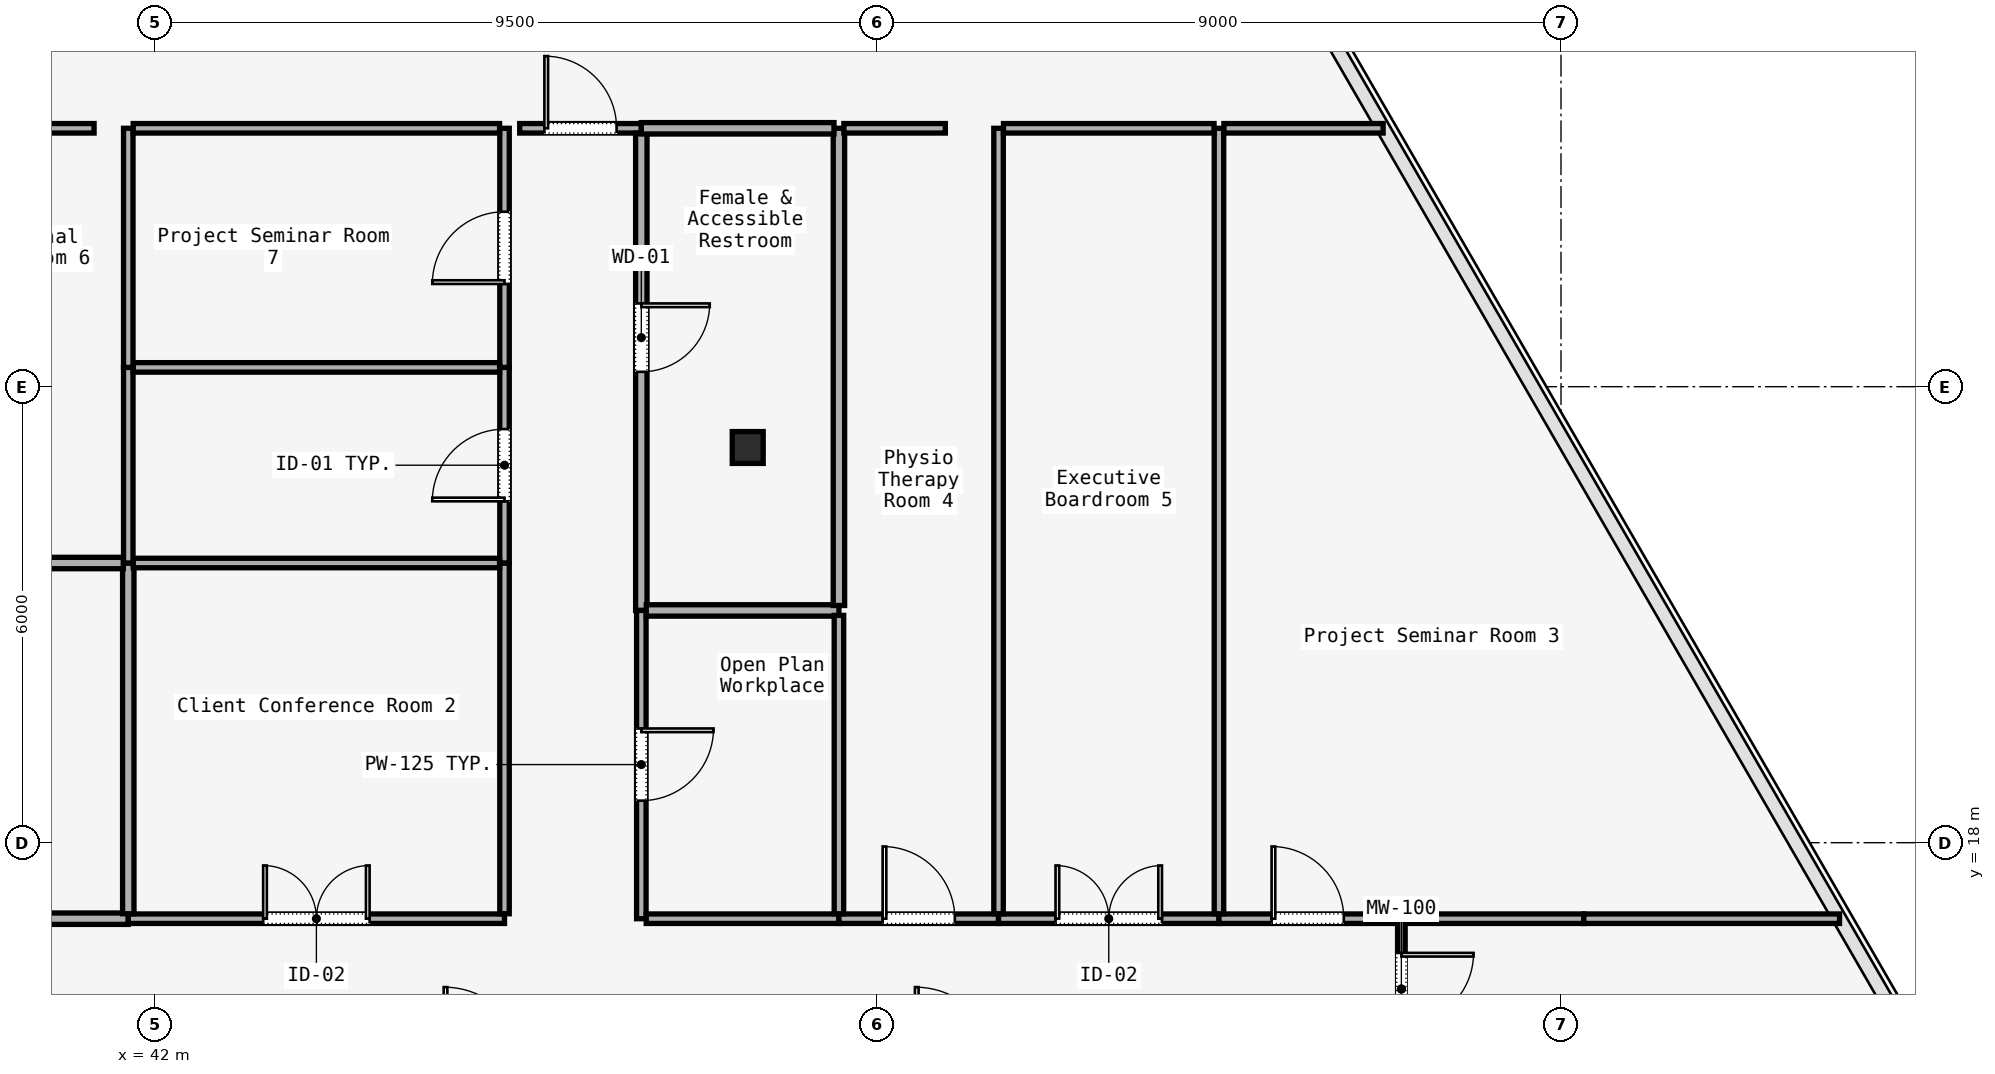
"""IFC4 building model, lengths in metres.
Left out: names, types, materials, properties, quantities, classifications, styles, units other than length and angle.
Written with IfcOpenShell. Run it as: python <this file> out.ifc"""

import sys

from ifc_helpers import new_model, si_unit, direction, frame, frame_2d, origin, origin_2d, place, context, subcontext, project, spatial, rectangle, i_section, extrude, element, fill, save


model = new_model("IFC4")
c1 = context("Model", 3, precision=1e-05, world=origin(), true_north=direction((0.0, 1.0)))
c2 = subcontext(c1, "Body", "Model", "MODEL_VIEW")
j1 = project(units=[si_unit("LENGTHUNIT", "METRE"), si_unit("PLANEANGLEUNIT", "RADIAN")], contexts=[c1])
p1 = place(None, origin())
s1 = spatial("IfcSite", under=j1, at=p1, CompositionType="ELEMENT")
p2 = place(p1, origin())
s2 = spatial("IfcBuilding", under=s1, at=p2, CompositionType="ELEMENT")
p3 = place(p2, frame((0.0, 0.0, 168.8)))
s3 = spatial("IfcBuildingStorey", under=s2, at=p3, CompositionType="ELEMENT", Elevation=168.8)
p4 = place(p3, frame((49.8, 23.2, 0.0), z_axis=(0.0, 0.0, 1.0), x_axis=(1.0, 0.0, 0.0)))
e1 = element("IfcColumn", 1, at=p4, inside=s3, PredefinedType="COLUMN", context=c2, shape_type="SweptSolid", body=[
    extrude(i_section(OverallWidth=0.407, OverallDepth=0.419, WebThickness=0.031, FlangeThickness=0.049, FilletRadius=0.015, at=origin_2d()), origin(), (0.0, 0.0, 1.0), 3.58),
])
p5 = place(p3, frame((58.4, 17.0, 0.0), z_axis=(0.0, 0.0, 1.0), x_axis=(0.0, -1.0, 0.0)))
e2 = element("IfcWall", 2, at=p5, inside=s3, PredefinedType="MOVABLE", context=c2, shape_type="SweptSolid", body=[
    extrude(rectangle(XDim=1.85, YDim=0.1, at=frame_2d((0.925, 0.0))), origin(), (0.0, 0.0, 1.0), 3.01),
])
p6 = place(p5, frame((0.45, 0.0, 0.0)))
e3 = element("IfcOpeningElement", 3, at=p6, cuts=e2, PredefinedType="OPENING", context=c2, shape_type="SweptSolid", body=[
    extrude(rectangle(XDim=0.95, YDim=2.2, at=frame_2d((0.475, 1.1))), frame((0.0, 0.05, 0.0), z_axis=(0.0, -1.0, 0.0), x_axis=(1.0, 0.0, 0.0)), (0.0, 0.0, 1.0), 0.1),
])
p7 = place(p3, frame((37.665, 17.0, 0.0), z_axis=(0.0, 0.0, 1.0), x_axis=(1.0, 0.0, 0.0)))
e4 = element("IfcWall", 4, at=p7, inside=s3, PredefinedType="PARTITIONING", context=c2, shape_type="SweptSolid", body=[
    extrude(rectangle(XDim=3.985, YDim=0.15, at=frame_2d((1.992, 0.0))), origin(), (0.0, 0.0, 1.0), 3.01),
])
p8 = place(p3, frame((41.65, 17.0, 0.0), z_axis=(0.0, 0.0, 1.0), x_axis=(1.0, 0.0, 0.0)))
e5 = element("IfcWall", 5, at=p8, inside=s3, PredefinedType="PARTITIONING", context=c2, shape_type="SweptSolid", body=[
    extrude(rectangle(XDim=4.95, YDim=0.125, at=frame_2d((2.475, 0.0))), origin(), (0.0, 0.0, 1.0), 3.01),
])
p9 = place(p8, frame((1.775, 0.0, 0.0)))
e6 = element("IfcOpeningElement", 6, at=p9, cuts=e5, PredefinedType="OPENING", context=c2, shape_type="SweptSolid", body=[
    extrude(rectangle(XDim=1.4, YDim=2.2, at=frame_2d((0.7, 1.1))), frame((0.0, 0.062, 0.0), z_axis=(0.0, -1.0, 0.0), x_axis=(1.0, 0.0, 0.0)), (0.0, 0.0, 1.0), 0.125),
])
p10 = place(p3, frame((46.6, 17.065, 0.0), z_axis=(0.0, 0.0, 1.0), x_axis=(0.0, 1.0, 0.0)))
e7 = element("IfcWall", 7, at=p10, inside=s3, PredefinedType="PARTITIONING", context=c2, shape_type="SweptSolid", body=[
    extrude(rectangle(XDim=4.615, YDim=0.125, at=frame_2d((2.308, 0.0))), origin(), (0.0, 0.0, 1.0), 3.01),
])
p11 = place(p3, frame((46.6, 21.68, 0.0), z_axis=(0.0, 0.0, 1.0), x_axis=(0.0, 1.0, 0.0)))
e8 = element("IfcWall", 8, at=p11, inside=s3, PredefinedType="PARTITIONING", context=c2, shape_type="SweptSolid", body=[
    extrude(rectangle(XDim=2.574, YDim=0.125, at=frame_2d((1.287, 0.0))), origin(), (0.0, 0.0, 1.0), 3.01),
])
p12 = place(p11, frame((0.812, 0.0, 0.0)))
e9 = element("IfcOpeningElement", 9, at=p12, cuts=e8, PredefinedType="OPENING", context=c2, shape_type="SweptSolid", body=[
    extrude(rectangle(XDim=0.95, YDim=2.2, at=frame_2d((0.475, 1.1))), frame((0.0, 0.062, 0.0), z_axis=(0.0, -1.0, 0.0), x_axis=(1.0, 0.0, 0.0)), (0.0, 0.0, 1.0), 0.125),
])
p13 = place(p3, frame((46.6, 24.254, 0.0), z_axis=(0.0, 0.0, 1.0), x_axis=(0.0, 1.0, 0.0)))
e10 = element("IfcWall", 10, at=p13, inside=s3, PredefinedType="PARTITIONING", context=c2, shape_type="SweptSolid", body=[
    extrude(rectangle(XDim=3.146, YDim=0.125, at=frame_2d((1.573, 0.0))), origin(), (0.0, 0.0, 1.0), 3.01),
])
p14 = place(p13, frame((1.098, 0.0, 0.0)))
e11 = element("IfcOpeningElement", 11, at=p14, cuts=e10, PredefinedType="OPENING", context=c2, shape_type="SweptSolid", body=[
    extrude(rectangle(XDim=0.95, YDim=2.2, at=frame_2d((0.475, 1.1))), frame((0.0, 0.062, 0.0), z_axis=(0.0, -1.0, 0.0), x_axis=(1.0, 0.0, 0.0)), (0.0, 0.0, 1.0), 0.125),
])
p15 = place(p3, frame((46.8, 27.4, 0.0), z_axis=(0.0, 0.0, 1.0), x_axis=(1.0, 0.0, 0.0)))
e12 = element("IfcWall", 12, at=p15, inside=s3, PredefinedType="PARTITIONING", context=c2, shape_type="SweptSolid", body=[
    extrude(rectangle(XDim=1.6, YDim=0.125, at=frame_2d((0.8, 0.0))), origin(), (0.0, 0.0, 1.0), 3.01),
])
p16 = place(p15, frame((0.325, 0.0, 0.0)))
e13 = element("IfcOpeningElement", 13, at=p16, cuts=e12, PredefinedType="OPENING", context=c2, shape_type="SweptSolid", body=[
    extrude(rectangle(XDim=0.95, YDim=2.2, at=frame_2d((0.475, 1.1))), frame((0.0, 0.062, 0.0), z_axis=(0.0, -1.0, 0.0), x_axis=(1.0, 0.0, 0.0)), (0.0, 0.0, 1.0), 0.125),
])
p17 = place(p3, frame((48.4, 27.335, 0.0), z_axis=(0.0, 0.0, 1.0), x_axis=(0.0, -1.0, 0.0)))
e14 = element("IfcWall", 14, at=p17, inside=s3, PredefinedType="PARTITIONING", context=c2, shape_type="SweptSolid", body=[
    extrude(rectangle(XDim=6.279, YDim=0.15, at=frame_2d((3.14, 0.0))), origin(), (0.0, 0.0, 1.0), 3.01),
])
p18 = place(p17, frame((2.24, 0.0, 0.0)))
e15 = element("IfcOpeningElement", 15, at=p18, cuts=e14, PredefinedType="OPENING", context=c2, shape_type="SweptSolid", body=[
    extrude(rectangle(XDim=0.9, YDim=2.15, at=frame_2d((0.45, 1.075))), frame((0.0, 0.075, 0.0), z_axis=(0.0, -1.0, 0.0), x_axis=(1.0, 0.0, 0.0)), (0.0, 0.0, 1.0), 0.15),
])
p19 = place(p3, frame((48.4, 21.056, 0.0), z_axis=(0.0, 0.0, 1.0), x_axis=(0.0, -1.0, 0.0)))
e16 = element("IfcWall", 16, at=p19, inside=s3, PredefinedType="PARTITIONING", context=c2, shape_type="SweptSolid", body=[
    extrude(rectangle(XDim=4.056, YDim=0.125, at=frame_2d((2.028, 0.0))), origin(), (0.0, 0.0, 1.0), 3.01),
])
p20 = place(p19, frame((1.553, 0.0, 0.0)))
e17 = element("IfcOpeningElement", 17, at=p20, cuts=e16, PredefinedType="OPENING", context=c2, shape_type="SweptSolid", body=[
    extrude(rectangle(XDim=0.95, YDim=2.2, at=frame_2d((0.475, 1.1))), frame((0.0, 0.062, 0.0), z_axis=(0.0, -1.0, 0.0), x_axis=(1.0, 0.0, 0.0)), (0.0, 0.0, 1.0), 0.125),
])
p21 = place(p3, frame((48.465, 17.0, 0.0), z_axis=(0.0, 0.0, 1.0), x_axis=(1.0, 0.0, 0.0)))
e18 = element("IfcWall", 18, at=p21, inside=s3, PredefinedType="PARTITIONING", context=c2, shape_type="SweptSolid", body=[
    extrude(rectangle(XDim=2.535, YDim=0.125, at=frame_2d((1.268, 0.0))), origin(), (0.0, 0.0, 1.0), 3.01),
])
p22 = place(p3, frame((51.0, 17.0, 0.0), z_axis=(0.0, 0.0, 1.0), x_axis=(1.0, 0.0, 0.0)))
e19 = element("IfcWall", 19, at=p22, inside=s3, PredefinedType="PARTITIONING", context=c2, shape_type="SweptSolid", body=[
    extrude(rectangle(XDim=2.1, YDim=0.125, at=frame_2d((1.05, 0.0))), origin(), (0.0, 0.0, 1.0), 3.01),
])
p23 = place(p22, frame((0.575, 0.0, 0.0)))
e20 = element("IfcOpeningElement", 20, at=p23, cuts=e19, PredefinedType="OPENING", context=c2, shape_type="SweptSolid", body=[
    extrude(rectangle(XDim=0.95, YDim=2.2, at=frame_2d((0.475, 1.1))), frame((0.0, 0.062, 0.0), z_axis=(0.0, -1.0, 0.0), x_axis=(1.0, 0.0, 0.0)), (0.0, 0.0, 1.0), 0.125),
])
p24 = place(p3, frame((53.1, 17.0, 0.0), z_axis=(0.0, 0.0, 1.0), x_axis=(1.0, 0.0, 0.0)))
e21 = element("IfcWall", 21, at=p24, inside=s3, PredefinedType="PARTITIONING", context=c2, shape_type="SweptSolid", body=[
    extrude(rectangle(XDim=2.9, YDim=0.125, at=frame_2d((1.45, 0.0))), origin(), (0.0, 0.0, 1.0), 3.01),
])
p25 = place(p24, frame((0.75, 0.0, 0.0)))
e22 = element("IfcOpeningElement", 22, at=p25, cuts=e21, PredefinedType="OPENING", context=c2, shape_type="SweptSolid", body=[
    extrude(rectangle(XDim=1.4, YDim=2.2, at=frame_2d((0.7, 1.1))), frame((0.0, 0.062, 0.0), z_axis=(0.0, -1.0, 0.0), x_axis=(1.0, 0.0, 0.0)), (0.0, 0.0, 1.0), 0.125),
])
p26 = place(p3, frame((56.0, 17.0, 0.0), z_axis=(0.0, 0.0, 1.0), x_axis=(1.0, 0.0, 0.0)))
e23 = element("IfcWall", 23, at=p26, inside=s3, PredefinedType="PARTITIONING", context=c2, shape_type="SweptSolid", body=[
    extrude(rectangle(XDim=2.335, YDim=0.125, at=frame_2d((1.167, 0.0))), origin(), (0.0, 0.0, 1.0), 3.01),
])
p27 = place(p26, frame((0.692, 0.0, 0.0)))
e24 = element("IfcOpeningElement", 24, at=p27, cuts=e23, PredefinedType="OPENING", context=c2, shape_type="SweptSolid", body=[
    extrude(rectangle(XDim=0.95, YDim=2.2, at=frame_2d((0.475, 1.1))), frame((0.0, 0.062, 0.0), z_axis=(0.0, -1.0, 0.0), x_axis=(1.0, 0.0, 0.0)), (0.0, 0.0, 1.0), 0.125),
])
p28 = place(p3, frame((58.465, 17.0, 0.0), z_axis=(0.0, 0.0, 1.0), x_axis=(1.0, 0.0, 0.0)))
e25 = element("IfcWall", 25, at=p28, inside=s3, PredefinedType="PARTITIONING", context=c2, shape_type="SweptSolid", body=[
    extrude(rectangle(XDim=2.335, YDim=0.125, at=frame_2d((1.167, 0.0))), origin(), (0.0, 0.0, 1.0), 3.01),
])
p29 = place(p3, frame((60.8, 17.0, 0.0), z_axis=(0.0, 0.0, 1.0), x_axis=(1.0, 0.0, 0.0)))
e26 = element("IfcWall", 26, at=p29, inside=s3, PredefinedType="PARTITIONING", context=c2, shape_type="SweptSolid", body=[
    extrude(rectangle(XDim=3.365, YDim=0.125, at=frame_2d((1.682, 0.0))), origin(), (0.0, 0.0, 1.0), 3.01),
])
p30 = place(p3, frame((48.465, 21.056, 0.0), z_axis=(0.0, 0.0, 1.0), x_axis=(1.0, 0.0, 0.0)))
e27 = element("IfcWall", 27, at=p30, inside=s3, PredefinedType="PARTITIONING", context=c2, shape_type="SweptSolid", body=[
    extrude(rectangle(XDim=2.535, YDim=0.15, at=frame_2d((1.268, 0.0))), origin(), (0.0, 0.0, 1.0), 3.01),
])
p31 = place(p3, frame((51.0, 20.991, 0.0), z_axis=(0.0, 0.0, 1.0), x_axis=(0.0, -1.0, 0.0)))
e28 = element("IfcWall", 28, at=p31, inside=s3, PredefinedType="PARTITIONING", context=c2, shape_type="SweptSolid", body=[
    extrude(rectangle(XDim=3.926, YDim=0.125, at=frame_2d((1.963, 0.0))), origin(), (0.0, 0.0, 1.0), 3.01),
])
p32 = place(p3, frame((41.65, 21.68, 0.0), z_axis=(0.0, 0.0, 1.0), x_axis=(0.0, -1.0, 0.0)))
e29 = element("IfcWall", 29, at=p32, inside=s3, PredefinedType="PARTITIONING", context=c2, shape_type="SweptSolid", body=[
    extrude(rectangle(XDim=4.615, YDim=0.15, at=frame_2d((2.308, 0.0))), origin(), (0.0, 0.0, 1.0), 3.01),
])
p33 = place(p3, frame((37.665, 21.68, 0.0), z_axis=(0.0, 0.0, 1.0), x_axis=(1.0, 0.0, 0.0)))
e30 = element("IfcWall", 30, at=p33, inside=s3, PredefinedType="PARTITIONING", context=c2, shape_type="SweptSolid", body=[
    extrude(rectangle(XDim=3.92, YDim=0.15, at=frame_2d((1.96, 0.0))), origin(), (0.0, 0.0, 1.0), 3.01),
])
p34 = place(p3, frame((41.715, 21.68, 0.0), z_axis=(0.0, 0.0, 1.0), x_axis=(1.0, 0.0, 0.0)))
e31 = element("IfcWall", 31, at=p34, inside=s3, PredefinedType="PARTITIONING", context=c2, shape_type="SweptSolid", body=[
    extrude(rectangle(XDim=4.82, YDim=0.125, at=frame_2d((2.41, 0.0))), origin(), (0.0, 0.0, 1.0), 3.01),
])
p35 = place(p3, frame((56.0, 17.065, 0.0), z_axis=(0.0, 0.0, 1.0), x_axis=(0.0, 1.0, 0.0)))
e32 = element("IfcWall", 32, at=p35, inside=s3, PredefinedType="PARTITIONING", context=c2, shape_type="SweptSolid", body=[
    extrude(rectangle(XDim=10.335, YDim=0.125, at=frame_2d((5.167, 0.0))), origin(), (0.0, 0.0, 1.0), 3.01),
])
p36 = place(p3, frame((56.065, 27.4, 0.0), z_axis=(0.0, 0.0, 1.0), x_axis=(1.0, 0.0, 0.0)))
e33 = element("IfcWall", 33, at=p36, inside=s3, PredefinedType="PARTITIONING", context=c2, shape_type="SweptSolid", body=[
    extrude(rectangle(XDim=2.095, YDim=0.125, at=frame_2d((1.048, 0.0))), origin(), (0.0, 0.0, 1.0), 3.01),
])
p37 = place(p3, frame((51.0, 21.121, 0.0), z_axis=(0.0, 0.0, 1.0), x_axis=(0.0, 1.0, 0.0)))
e34 = element("IfcWall", 34, at=p37, inside=s3, PredefinedType="PARTITIONING", context=c2, shape_type="SweptSolid", body=[
    extrude(rectangle(XDim=6.279, YDim=0.15, at=frame_2d((3.139, 0.0))), origin(), (0.0, 0.0, 1.0), 3.01),
])
p38 = place(p3, frame((51.065, 27.4, 0.0), z_axis=(0.0, 0.0, 1.0), x_axis=(1.0, 0.0, 0.0)))
e35 = element("IfcWall", 35, at=p38, inside=s3, PredefinedType="PARTITIONING", context=c2, shape_type="SweptSolid", body=[
    extrude(rectangle(XDim=1.335, YDim=0.125, at=frame_2d((0.667, 0.0))), origin(), (0.0, 0.0, 1.0), 3.01),
])
p39 = place(p3, frame((53.1, 27.4, 0.0), z_axis=(0.0, 0.0, 1.0), x_axis=(0.0, -1.0, 0.0)))
e36 = element("IfcWall", 36, at=p39, inside=s3, PredefinedType="PARTITIONING", context=c2, shape_type="SweptSolid", body=[
    extrude(rectangle(XDim=10.335, YDim=0.125, at=frame_2d((5.167, 0.0))), origin(), (0.0, 0.0, 1.0), 3.01),
])
p40 = place(p3, frame((53.165, 27.4, 0.0), z_axis=(0.0, 0.0, 1.0), x_axis=(1.0, 0.0, 0.0)))
e37 = element("IfcWall", 37, at=p40, inside=s3, PredefinedType="PARTITIONING", context=c2, shape_type="SweptSolid", body=[
    extrude(rectangle(XDim=2.77, YDim=0.125, at=frame_2d((1.385, 0.0))), origin(), (0.0, 0.0, 1.0), 3.01),
])
p41 = place(p3, frame((41.65, 21.68, 0.0), z_axis=(0.0, 0.0, 1.0), x_axis=(0.0, 1.0, 0.0)))
e38 = element("IfcWall", 38, at=p41, inside=s3, PredefinedType="PARTITIONING", context=c2, shape_type="SweptSolid", body=[
    extrude(rectangle(XDim=2.574, YDim=0.125, at=frame_2d((1.287, 0.0))), origin(), (0.0, 0.0, 1.0), 3.01),
])
p42 = place(p3, frame((41.715, 24.254, 0.0), z_axis=(0.0, 0.0, 1.0), x_axis=(1.0, 0.0, 0.0)))
e39 = element("IfcWall", 39, at=p42, inside=s3, PredefinedType="PARTITIONING", context=c2, shape_type="SweptSolid", body=[
    extrude(rectangle(XDim=4.82, YDim=0.125, at=frame_2d((2.41, 0.0))), origin(), (0.0, 0.0, 1.0), 3.01),
])
p43 = place(p3, frame((48.4, 27.4, 0.0), z_axis=(0.0, 0.0, 1.0), x_axis=(1.0, 0.0, 0.0)))
e40 = element("IfcWall", 40, at=p43, inside=s3, PredefinedType="PARTITIONING", context=c2, shape_type="SweptSolid", body=[
    extrude(rectangle(XDim=2.535, YDim=0.15, at=frame_2d((1.268, 0.0))), origin(), (0.0, 0.0, 1.0), 3.01),
])
p44 = place(p3, frame((41.65, 27.4, 0.0), z_axis=(0.0, 0.0, 1.0), x_axis=(0.0, -1.0, 0.0)))
e41 = element("IfcWall", 41, at=p44, inside=s3, PredefinedType="PARTITIONING", context=c2, shape_type="SweptSolid", body=[
    extrude(rectangle(XDim=3.146, YDim=0.125, at=frame_2d((1.573, 0.0))), origin(), (0.0, 0.0, 1.0), 3.01),
])
p45 = place(p3, frame((38.445, 27.4, 0.0), z_axis=(0.0, 0.0, 1.0), x_axis=(1.0, 0.0, 0.0)))
e42 = element("IfcWall", 42, at=p45, inside=s3, PredefinedType="PARTITIONING", context=c2, shape_type="SweptSolid", body=[
    extrude(rectangle(XDim=2.755, YDim=0.125, at=frame_2d((1.377, 0.0))), origin(), (0.0, 0.0, 1.0), 3.01),
])
p46 = place(p3, frame((41.715, 27.4, 0.0), z_axis=(0.0, 0.0, 1.0), x_axis=(1.0, 0.0, 0.0)))
e43 = element("IfcWall", 43, at=p46, inside=s3, PredefinedType="PARTITIONING", context=c2, shape_type="SweptSolid", body=[
    extrude(rectangle(XDim=4.82, YDim=0.125, at=frame_2d((2.41, 0.0))), origin(), (0.0, 0.0, 1.0), 3.01),
])
p47 = place(p6, origin())
e44 = element("IfcDoor", 44, at=p47, inside=s3, OperationType="SINGLE_SWING_RIGHT", PredefinedType="DOOR", context=c2, shape_type="SweptSolid", body=[
    extrude(rectangle(XDim=0.95, YDim=2.2, at=frame_2d((0.475, 1.1))), frame((0.0, 0.025, 0.0), z_axis=(0.0, -1.0, 0.0), x_axis=(1.0, 0.0, 0.0)), (0.0, 0.0, 1.0), 0.05),
])
fill(e3, e44)
p48 = place(p20, origin())
e45 = element("IfcDoor", 45, at=p48, inside=s3, OperationType="SINGLE_SWING_LEFT", PredefinedType="DOOR", context=c2, shape_type="SweptSolid", body=[
    extrude(rectangle(XDim=0.95, YDim=2.2, at=frame_2d((0.475, 1.1))), frame((0.0, 0.025, 0.0), z_axis=(0.0, -1.0, 0.0), x_axis=(1.0, 0.0, 0.0)), (0.0, 0.0, 1.0), 0.05),
])
fill(e17, e45)
p49 = place(p9, origin())
e46 = element("IfcDoor", 46, at=p49, inside=s3, OperationType="SINGLE_SWING_RIGHT", PredefinedType="DOOR", context=c2, shape_type="SweptSolid", body=[
    extrude(rectangle(XDim=1.4, YDim=2.2, at=frame_2d((0.7, 1.1))), frame((0.0, 0.025, 0.0), z_axis=(0.0, -1.0, 0.0), x_axis=(1.0, 0.0, 0.0)), (0.0, 0.0, 1.0), 0.05),
])
fill(e6, e46)
p50 = place(p27, origin())
e47 = element("IfcDoor", 47, at=p50, inside=s3, OperationType="SINGLE_SWING_LEFT", PredefinedType="DOOR", context=c2, shape_type="SweptSolid", body=[
    extrude(rectangle(XDim=0.95, YDim=2.2, at=frame_2d((0.475, 1.1))), frame((0.0, 0.025, 0.0), z_axis=(0.0, -1.0, 0.0), x_axis=(1.0, 0.0, 0.0)), (0.0, 0.0, 1.0), 0.05),
])
fill(e24, e47)
p51 = place(p23, origin())
e48 = element("IfcDoor", 48, at=p51, inside=s3, OperationType="SINGLE_SWING_LEFT", PredefinedType="DOOR", context=c2, shape_type="SweptSolid", body=[
    extrude(rectangle(XDim=0.95, YDim=2.2, at=frame_2d((0.475, 1.1))), frame((0.0, 0.025, 0.0), z_axis=(0.0, -1.0, 0.0), x_axis=(1.0, 0.0, 0.0)), (0.0, 0.0, 1.0), 0.05),
])
fill(e20, e48)
p52 = place(p25, origin())
e49 = element("IfcDoor", 49, at=p52, inside=s3, OperationType="SINGLE_SWING_RIGHT", PredefinedType="DOOR", context=c2, shape_type="SweptSolid", body=[
    extrude(rectangle(XDim=1.4, YDim=2.2, at=frame_2d((0.7, 1.1))), frame((0.0, 0.025, 0.0), z_axis=(0.0, -1.0, 0.0), x_axis=(1.0, 0.0, 0.0)), (0.0, 0.0, 1.0), 0.05),
])
fill(e22, e49)
p53 = place(p12, origin())
e50 = element("IfcDoor", 50, at=p53, inside=s3, OperationType="SINGLE_SWING_LEFT", PredefinedType="DOOR", context=c2, shape_type="SweptSolid", body=[
    extrude(rectangle(XDim=0.95, YDim=2.2, at=frame_2d((0.475, 1.1))), frame((0.0, 0.025, 0.0), z_axis=(0.0, -1.0, 0.0), x_axis=(1.0, 0.0, 0.0)), (0.0, 0.0, 1.0), 0.05),
])
fill(e9, e50)
p54 = place(p18, origin())
e51 = element("IfcDoor", 51, at=p54, inside=s3, OperationType="SINGLE_SWING_RIGHT", PredefinedType="DOOR", context=c2, shape_type="SweptSolid", body=[
    extrude(rectangle(XDim=0.9, YDim=2.15, at=frame_2d((0.45, 1.075))), frame((0.0, 0.025, 0.0), z_axis=(0.0, -1.0, 0.0), x_axis=(1.0, 0.0, 0.0)), (0.0, 0.0, 1.0), 0.05),
])
fill(e15, e51)
p55 = place(p14, origin())
e52 = element("IfcDoor", 52, at=p55, inside=s3, OperationType="SINGLE_SWING_LEFT", PredefinedType="DOOR", context=c2, shape_type="SweptSolid", body=[
    extrude(rectangle(XDim=0.95, YDim=2.2, at=frame_2d((0.475, 1.1))), frame((0.0, 0.025, 0.0), z_axis=(0.0, -1.0, 0.0), x_axis=(1.0, 0.0, 0.0)), (0.0, 0.0, 1.0), 0.05),
])
fill(e11, e52)
p56 = place(p16, origin())
e53 = element("IfcDoor", 53, at=p56, inside=s3, OperationType="SINGLE_SWING_LEFT", PredefinedType="DOOR", context=c2, shape_type="SweptSolid", body=[
    extrude(rectangle(XDim=0.95, YDim=2.2, at=frame_2d((0.475, 1.1))), frame((0.0, 0.025, 0.0), z_axis=(0.0, -1.0, 0.0), x_axis=(1.0, 0.0, 0.0)), (0.0, 0.0, 1.0), 0.05),
])
fill(e13, e53)
save(model, sys.argv[1])
